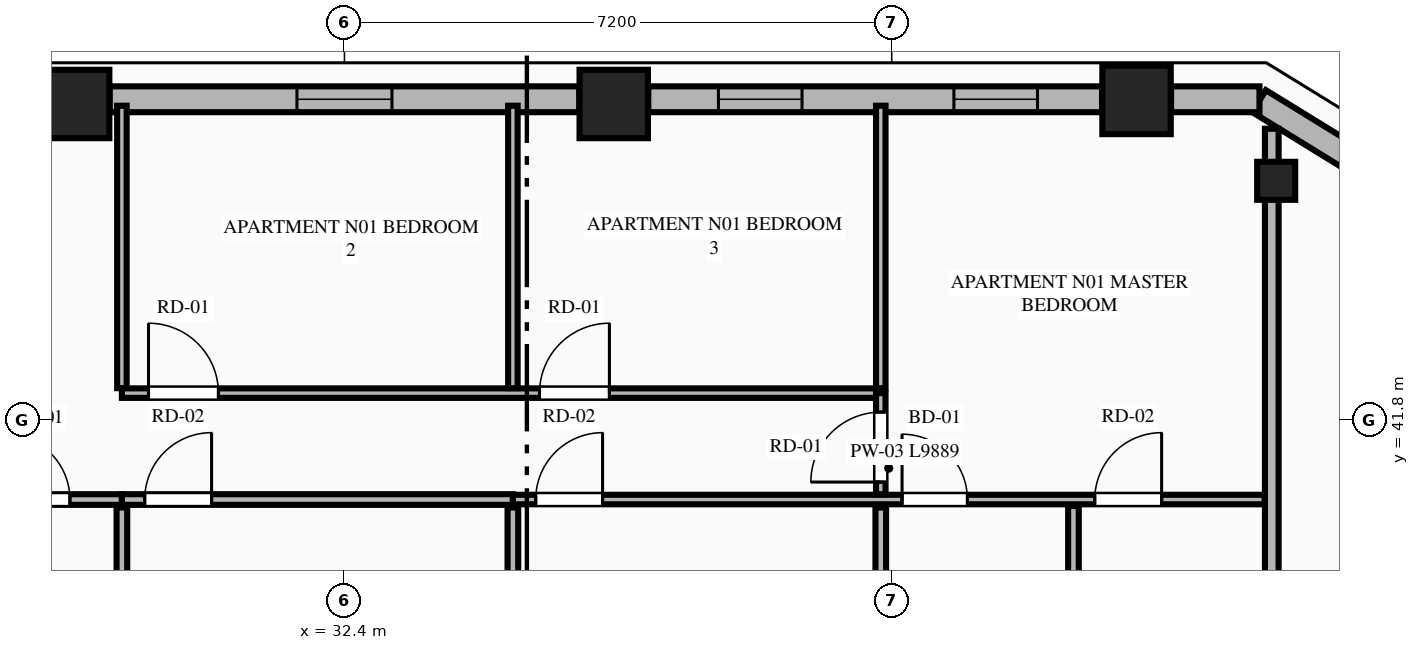
"""IFC4 building model, lengths in metres.
Left out: names, types, materials, properties, quantities, classifications, styles, units other than length and angle.
Written with IfcOpenShell. Run it as: python <this file> out.ifc"""

import sys

from ifc_helpers import new_model, si_unit, direction, frame, frame_2d, origin, origin_2d, place, context, subcontext, project, spatial, rectangle, extrude, element, fill, save


model = new_model("IFC4")
c1 = context("Model", 3, precision=1e-05, world=origin(), true_north=direction((0.0, 1.0)))
c2 = subcontext(c1, "Body", "Model", "MODEL_VIEW")
j1 = project(units=[si_unit("LENGTHUNIT", "METRE"), si_unit("PLANEANGLEUNIT", "RADIAN")], contexts=[c1])
p1 = place(None, origin())
s1 = spatial("IfcSite", under=j1, at=p1, CompositionType="ELEMENT")
p2 = place(p1, origin())
s2 = spatial("IfcBuilding", under=s1, at=p2, CompositionType="ELEMENT")
p3 = place(p2, frame((0.0, 0.0, 189.65)))
s3 = spatial("IfcBuildingStorey", under=s2, at=p3, CompositionType="ELEMENT", Elevation=189.65)
for number, where, z_axis, x_axis in (
    (1, (42.821, 46.011, 0.0), (0.0, 0.0, 1.0), (1.0, 0.0, 0.0)),
    (2, (35.943, 45.958, 0.0), (0.0, 0.0, 1.0), (1.0, 0.0, 0.0)),
    (3, (28.857, 45.958, 0.0), (0.0, 0.0, 1.0), (1.0, 0.0, 0.0)),
):
    element("IfcColumn", number, at=place(p3, frame(where, z_axis=z_axis, x_axis=x_axis)), inside=s3, PredefinedType="COLUMN", context=c2, shape_type="SweptSolid", body=[
        extrude(rectangle(XDim=0.9, YDim=0.9, at=origin_2d()), origin(), (0.0, 0.0, 1.0), 3.55),
    ])
p4 = place(p3, frame((44.658, 44.947, 0.0), z_axis=(0.0, 0.0, 1.0), x_axis=(-0.865230187018, 0.501374833306, 0.0)))
e4 = element("IfcColumn", 4, at=p4, inside=s3, PredefinedType="PILASTER", context=c2, shape_type="SweptSolid", body=[
    extrude(rectangle(XDim=0.5, YDim=0.35, at=origin_2d()), origin(), (0.0, 0.0, 1.0), 3.55),
])
p5 = place(p3, frame((45.862, 45.116, 0.0), z_axis=(0.0, 0.0, 1.0), x_axis=(-0.851713271379, 0.524008113828, 0.0)))
e5 = element("IfcWall", 5, at=p5, inside=s3, PredefinedType="STANDARD", context=c2, shape_type="SweptSolid", body=[
    extrude(rectangle(XDim=1.678, YDim=0.34, at=frame_2d((0.839, 0.0))), origin(), (0.0, 0.0, 1.0), 3.35),
])
p6 = place(p3, frame((44.438, 46.02, 0.0), z_axis=(0.0, 0.0, 1.0), x_axis=(-1.0, 0.0, 0.0)))
e6 = element("IfcWall", 6, at=p6, inside=s3, PredefinedType="STANDARD", context=c2, shape_type="SweptSolid", body=[
    extrude(rectangle(XDim=1.163, YDim=0.34, at=frame_2d((0.582, 0.0))), origin(), (0.0, 0.0, 1.0), 3.35),
])
p7 = place(p3, frame((42.367, 46.02, 0.0), z_axis=(0.0, 0.0, 1.0), x_axis=(-1.0, 0.0, 0.0)))
e7 = element("IfcWall", 7, at=p7, inside=s3, PredefinedType="STANDARD", context=c2, shape_type="SweptSolid", body=[
    extrude(rectangle(XDim=5.97, YDim=0.34, at=frame_2d((2.985, 0.0))), origin(), (0.0, 0.0, 1.0), 2.883),
])
p8 = place(p7, frame((0.849, 0.0, 0.75)))
e8 = element("IfcOpeningElement", 8, at=p8, cuts=e7, PredefinedType="OPENING", context=c2, shape_type="SweptSolid", body=[
    extrude(rectangle(XDim=1.1, YDim=1.983, at=frame_2d((0.55, 0.991))), frame((0.0, 0.18, 0.0), z_axis=(0.0, -1.0, 0.0), x_axis=(1.0, 0.0, 0.0)), (0.0, 0.0, 1.0), 0.36),
])
p9 = place(p7, frame((3.947, 0.0, 0.75)))
e9 = element("IfcOpeningElement", 9, at=p9, cuts=e7, PredefinedType="OPENING", context=c2, shape_type="SweptSolid", body=[
    extrude(rectangle(XDim=1.1, YDim=1.983, at=frame_2d((0.55, 0.991))), frame((0.0, 0.18, 0.0), z_axis=(0.0, -1.0, 0.0), x_axis=(1.0, 0.0, 0.0)), (0.0, 0.0, 1.0), 0.36),
])
p10 = place(p3, frame((35.489, 46.02, 0.0), z_axis=(0.0, 0.0, 1.0), x_axis=(-1.0, 0.0, 0.0)))
e10 = element("IfcWall", 10, at=p10, inside=s3, PredefinedType="STANDARD", context=c2, shape_type="SweptSolid", body=[
    extrude(rectangle(XDim=6.178, YDim=0.34, at=frame_2d((3.089, 0.0))), origin(), (0.0, 0.0, 1.0), 2.883),
])
p11 = place(p10, frame((2.464, 0.0, 0.75)))
e11 = element("IfcOpeningElement", 11, at=p11, cuts=e10, PredefinedType="OPENING", context=c2, shape_type="SweptSolid", body=[
    extrude(rectangle(XDim=1.25, YDim=1.95, at=frame_2d((0.625, 0.975))), frame((0.0, 0.18, 0.0), z_axis=(0.0, -1.0, 0.0), x_axis=(1.0, 0.0, 0.0)), (0.0, 0.0, 1.0), 0.36),
])
p12 = place(p3, frame((44.6, 35.15, 0.0), z_axis=(0.0, 0.0, 1.0), x_axis=(0.0, 1.0, 0.0)))
e12 = element("IfcWall", 12, at=p12, inside=s3, PredefinedType="PARTITIONING", context=c2, shape_type="SweptSolid", body=[
    extrude(rectangle(XDim=10.482, YDim=0.18, at=frame_2d((5.241, 0.0))), origin(), (0.0, 0.0, 1.0), 3.35),
])
p13 = place(p3, frame((22.25, 40.754, 0.0), z_axis=(0.0, 0.0, 1.0), x_axis=(1.0, 0.0, 0.0)))
e13 = element("IfcWall", 13, at=p13, inside=s3, PredefinedType="PLUMBINGWALL", context=c2, shape_type="SweptSolid", body=[
    extrude(rectangle(XDim=7.222, YDim=0.14, at=frame_2d((3.611, 0.0))), origin(), (0.0, 0.0, 1.0), 3.35),
])
p14 = place(p13, frame((5.678, 0.0, 0.0)))
e14 = element("IfcOpeningElement", 14, at=p14, cuts=e13, PredefinedType="OPENING", context=c2, shape_type="SweptSolid", body=[
    extrude(rectangle(XDim=0.86, YDim=2.1, at=frame_2d((0.43, 1.05))), frame((0.0, 0.08, 0.0), z_axis=(0.0, -1.0, 0.0), x_axis=(1.0, 0.0, 0.0)), (0.0, 0.0, 1.0), 0.16),
])
p15 = place(p13, frame((0.26, 0.0, 0.0)))
e15 = element("IfcOpeningElement", 15, at=p15, cuts=e13, PredefinedType="OPENING", context=c2, shape_type="SweptSolid", body=[
    extrude(rectangle(XDim=0.88, YDim=2.15, at=frame_2d((0.44, 1.075))), frame((0.0, 0.08, 0.0), z_axis=(0.0, -1.0, 0.0), x_axis=(1.0, 0.0, 0.0)), (0.0, 0.0, 1.0), 0.16),
])
p16 = place(p13, frame((3.424, 0.0, 0.0)))
e16 = element("IfcOpeningElement", 16, at=p16, cuts=e13, PredefinedType="OPENING", context=c2, shape_type="SweptSolid", body=[
    extrude(rectangle(XDim=0.88, YDim=2.15, at=frame_2d((0.44, 1.075))), frame((0.0, 0.08, 0.0), z_axis=(0.0, -1.0, 0.0), x_axis=(1.0, 0.0, 0.0)), (0.0, 0.0, 1.0), 0.16),
])
p17 = place(p3, frame((29.472, 40.754, 0.0), z_axis=(0.0, 0.0, 1.0), x_axis=(1.0, 0.0, 0.0)))
e17 = element("IfcWall", 17, at=p17, inside=s3, PredefinedType="PLUMBINGWALL", context=c2, shape_type="SweptSolid", body=[
    extrude(rectangle(XDim=5.144, YDim=0.14, at=frame_2d((2.572, 0.0))), origin(), (0.0, 0.0, 1.0), 3.35),
])
p18 = place(p17, frame((0.3, 0.0, 0.0)))
e18 = element("IfcOpeningElement", 18, at=p18, cuts=e17, PredefinedType="OPENING", context=c2, shape_type="SweptSolid", body=[
    extrude(rectangle(XDim=0.88, YDim=2.15, at=frame_2d((0.44, 1.075))), frame((0.0, 0.08, 0.0), z_axis=(0.0, -1.0, 0.0), x_axis=(1.0, 0.0, 0.0)), (0.0, 0.0, 1.0), 0.16),
])
p19 = place(p3, frame((34.616, 40.754, 0.0), z_axis=(0.0, 0.0, 1.0), x_axis=(1.0, 0.0, 0.0)))
e19 = element("IfcWall", 19, at=p19, inside=s3, PredefinedType="PARTITIONING", context=c2, shape_type="SweptSolid", body=[
    extrude(rectangle(XDim=9.889, YDim=0.125, at=frame_2d((4.944, 0.0))), origin(), (0.0, 0.0, 1.0), 3.35),
])
p20 = place(p19, frame((5.12, 0.0, 0.0)))
e20 = element("IfcOpeningElement", 20, at=p20, cuts=e19, PredefinedType="OPENING", context=c2, shape_type="SweptSolid", body=[
    extrude(rectangle(XDim=0.86, YDim=2.1, at=frame_2d((0.43, 1.05))), frame((0.0, 0.073, 0.0), z_axis=(0.0, -1.0, 0.0), x_axis=(1.0, 0.0, 0.0)), (0.0, 0.0, 1.0), 0.145),
])
p21 = place(p19, frame((7.655, 0.0, 0.0)))
e21 = element("IfcOpeningElement", 21, at=p21, cuts=e19, PredefinedType="OPENING", context=c2, shape_type="SweptSolid", body=[
    extrude(rectangle(XDim=0.88, YDim=2.15, at=frame_2d((0.44, 1.075))), frame((0.0, 0.073, 0.0), z_axis=(0.0, -1.0, 0.0), x_axis=(1.0, 0.0, 0.0)), (0.0, 0.0, 1.0), 0.145),
])
p22 = place(p19, frame((0.3, 0.0, 0.0)))
e22 = element("IfcOpeningElement", 22, at=p22, cuts=e19, PredefinedType="OPENING", context=c2, shape_type="SweptSolid", body=[
    extrude(rectangle(XDim=0.88, YDim=2.15, at=frame_2d((0.44, 1.075))), frame((0.0, 0.073, 0.0), z_axis=(0.0, -1.0, 0.0), x_axis=(1.0, 0.0, 0.0)), (0.0, 0.0, 1.0), 0.145),
])
p23 = place(p3, frame((29.472, 42.219, 0.0), z_axis=(0.0, 0.0, 1.0), x_axis=(0.0, 1.0, 0.0)))
e23 = element("IfcWall", 23, at=p23, inside=s3, PredefinedType="PARTITIONING", context=c2, shape_type="SweptSolid", body=[
    extrude(rectangle(XDim=3.716, YDim=0.125, at=frame_2d((1.858, 0.0))), origin(), (0.0, 0.0, 1.0), 3.35),
])
p24 = place(p3, frame((29.472, 42.154, 0.0), z_axis=(0.0, 0.0, 1.0), x_axis=(1.0, 0.0, 0.0)))
e24 = element("IfcWall", 24, at=p24, inside=s3, PredefinedType="PARTITIONING", context=c2, shape_type="SweptSolid", body=[
    extrude(rectangle(XDim=9.984, YDim=0.125, at=frame_2d((4.992, 0.0))), origin(), (0.0, 0.0, 1.0), 3.35),
])
p25 = place(p24, frame((0.35, 0.0, 0.0)))
e25 = element("IfcOpeningElement", 25, at=p25, cuts=e24, PredefinedType="OPENING", context=c2, shape_type="SweptSolid", body=[
    extrude(rectangle(XDim=0.92, YDim=2.15, at=frame_2d((0.46, 1.075))), frame((0.0, 0.073, 0.0), z_axis=(0.0, -1.0, 0.0), x_axis=(1.0, 0.0, 0.0)), (0.0, 0.0, 1.0), 0.145),
])
p26 = place(p24, frame((5.494, 0.0, 0.0)))
e26 = element("IfcOpeningElement", 26, at=p26, cuts=e24, PredefinedType="OPENING", context=c2, shape_type="SweptSolid", body=[
    extrude(rectangle(XDim=0.92, YDim=2.15, at=frame_2d((0.46, 1.075))), frame((0.0, 0.073, 0.0), z_axis=(0.0, -1.0, 0.0), x_axis=(1.0, 0.0, 0.0)), (0.0, 0.0, 1.0), 0.145),
])
p27 = place(p3, frame((39.456, 40.824, 0.0), z_axis=(0.0, 0.0, 1.0), x_axis=(0.0, 1.0, 0.0)))
e27 = element("IfcWall", 27, at=p27, inside=s3, PredefinedType="PARTITIONING", context=c2, shape_type="SweptSolid", body=[
    extrude(rectangle(XDim=1.33, YDim=0.125, at=frame_2d((0.665, 0.0))), origin(), (0.0, 0.0, 1.0), 3.35),
])
p28 = place(p27, frame((0.16, 0.0, 0.0)))
e28 = element("IfcOpeningElement", 28, at=p28, cuts=e27, PredefinedType="OPENING", context=c2, shape_type="SweptSolid", body=[
    extrude(rectangle(XDim=0.92, YDim=2.15, at=frame_2d((0.46, 1.075))), frame((0.0, 0.073, 0.0), z_axis=(0.0, -1.0, 0.0), x_axis=(1.0, 0.0, 0.0)), (0.0, 0.0, 1.0), 0.145),
])
for number, where, z_axis, x_axis in (
    (29, (29.472, 35.235, 0.0), (0.0, 0.0, 1.0), (0.0, 1.0, 0.0)),
    (30, (34.616, 35.235, 0.0), (0.0, 0.0, 1.0), (0.0, 1.0, 0.0)),
):
    element("IfcWall", number, at=place(p3, frame(where, z_axis=z_axis, x_axis=x_axis)), inside=s3, PredefinedType="PLUMBINGWALL", context=c2, shape_type="SweptSolid", body=[
        extrude(rectangle(XDim=5.414, YDim=0.14, at=frame_2d((2.707, 0.0))), origin(), (0.0, 0.0, 1.0), 3.35),
    ])
for number, where, z_axis, x_axis in (
    (31, (34.616, 42.219, 0.0), (0.0, 0.0, 1.0), (0.0, 1.0, 0.0)),
    (32, (39.456, 42.219, 0.0), (0.0, 0.0, 1.0), (0.0, 1.0, 0.0)),
):
    element("IfcWall", number, at=place(p3, frame(where, z_axis=z_axis, x_axis=x_axis)), inside=s3, PredefinedType="PARTITIONING", context=c2, shape_type="SweptSolid", body=[
        extrude(rectangle(XDim=3.716, YDim=0.125, at=frame_2d((1.858, 0.0))), origin(), (0.0, 0.0, 1.0), 3.35),
    ])
p29 = place(p3, frame((39.456, 35.235, 0.0), z_axis=(0.0, 0.0, 1.0), x_axis=(0.0, 1.0, 0.0)))
e33 = element("IfcWall", 33, at=p29, inside=s3, PredefinedType="PLUMBINGWALL", context=c2, shape_type="SweptSolid", body=[
    extrude(rectangle(XDim=5.414, YDim=0.14, at=frame_2d((2.707, 0.0))), origin(), (0.0, 0.0, 1.0), 3.35),
])
p30 = place(p3, frame((41.991, 35.235, 0.0), z_axis=(0.0, 0.0, 1.0), x_axis=(0.0, 1.0, 0.0)))
e34 = element("IfcWall", 34, at=p30, inside=s3, PredefinedType="PLUMBINGWALL", context=c2, shape_type="SweptSolid", body=[
    extrude(rectangle(XDim=5.434, YDim=0.14, at=frame_2d((2.717, 0.0))), origin(), (0.0, 0.0, 1.0), 2.807),
])
p31 = place(p8, origin())
e35 = element("IfcWindow", 35, at=p31, inside=s3, PartitioningType="SINGLE_PANEL", PredefinedType="WINDOW", context=c2, shape_type="SweptSolid", body=[
    extrude(rectangle(XDim=1.1, YDim=1.983, at=frame_2d((0.55, 0.991))), frame((0.0, 0.03, 0.0), z_axis=(0.0, -1.0, 0.0), x_axis=(1.0, 0.0, 0.0)), (0.0, 0.0, 1.0), 0.06),
])
fill(e8, e35)
p32 = place(p11, origin())
e36 = element("IfcWindow", 36, at=p32, inside=s3, PartitioningType="SINGLE_PANEL", PredefinedType="WINDOW", context=c2, shape_type="SweptSolid", body=[
    extrude(rectangle(XDim=1.25, YDim=1.95, at=frame_2d((0.625, 0.975))), frame((0.0, 0.03, 0.0), z_axis=(0.0, -1.0, 0.0), x_axis=(1.0, 0.0, 0.0)), (0.0, 0.0, 1.0), 0.06),
])
fill(e11, e36)
p33 = place(p14, origin())
e37 = element("IfcDoor", 37, at=p33, inside=s3, OperationType="SINGLE_SWING_LEFT", PredefinedType="DOOR", context=c2, shape_type="SweptSolid", body=[
    extrude(rectangle(XDim=0.86, YDim=2.1, at=frame_2d((0.43, 1.05))), frame((0.0, 0.025, 0.0), z_axis=(0.0, -1.0, 0.0), x_axis=(1.0, 0.0, 0.0)), (0.0, 0.0, 1.0), 0.05),
])
fill(e14, e37)
p34 = place(p20, origin())
e38 = element("IfcDoor", 38, at=p34, inside=s3, OperationType="SINGLE_SWING_LEFT", PredefinedType="DOOR", context=c2, shape_type="SweptSolid", body=[
    extrude(rectangle(XDim=0.86, YDim=2.1, at=frame_2d((0.43, 1.05))), frame((0.0, 0.025, 0.0), z_axis=(0.0, -1.0, 0.0), x_axis=(1.0, 0.0, 0.0)), (0.0, 0.0, 1.0), 0.05),
])
fill(e20, e38)
p35 = place(p21, origin())
e39 = element("IfcDoor", 39, at=p35, inside=s3, OperationType="SINGLE_SWING_RIGHT", PredefinedType="DOOR", context=c2, shape_type="SweptSolid", body=[
    extrude(rectangle(XDim=0.88, YDim=2.15, at=frame_2d((0.44, 1.075))), frame((0.0, 0.025, 0.0), z_axis=(0.0, -1.0, 0.0), x_axis=(1.0, 0.0, 0.0)), (0.0, 0.0, 1.0), 0.05),
])
fill(e21, e39)
p36 = place(p18, origin())
e40 = element("IfcDoor", 40, at=p36, inside=s3, OperationType="SINGLE_SWING_RIGHT", PredefinedType="DOOR", context=c2, shape_type="SweptSolid", body=[
    extrude(rectangle(XDim=0.88, YDim=2.15, at=frame_2d((0.44, 1.075))), frame((0.0, 0.025, 0.0), z_axis=(0.0, -1.0, 0.0), x_axis=(1.0, 0.0, 0.0)), (0.0, 0.0, 1.0), 0.05),
])
fill(e18, e40)
p37 = place(p25, origin())
e41 = element("IfcDoor", 41, at=p37, inside=s3, OperationType="SINGLE_SWING_LEFT", PredefinedType="DOOR", context=c2, shape_type="SweptSolid", body=[
    extrude(rectangle(XDim=0.92, YDim=2.15, at=frame_2d((0.46, 1.075))), frame((0.0, 0.025, 0.0), z_axis=(0.0, -1.0, 0.0), x_axis=(1.0, 0.0, 0.0)), (0.0, 0.0, 1.0), 0.05),
])
fill(e25, e41)
p38 = place(p26, origin())
e42 = element("IfcDoor", 42, at=p38, inside=s3, OperationType="SINGLE_SWING_RIGHT", PredefinedType="DOOR", context=c2, shape_type="SweptSolid", body=[
    extrude(rectangle(XDim=0.92, YDim=2.15, at=frame_2d((0.46, 1.075))), frame((0.0, 0.025, 0.0), z_axis=(0.0, -1.0, 0.0), x_axis=(1.0, 0.0, 0.0)), (0.0, 0.0, 1.0), 0.05),
])
fill(e26, e42)
p39 = place(p28, origin())
e43 = element("IfcDoor", 43, at=p39, inside=s3, OperationType="SINGLE_SWING_LEFT", PredefinedType="DOOR", context=c2, shape_type="SweptSolid", body=[
    extrude(rectangle(XDim=0.92, YDim=2.15, at=frame_2d((0.46, 1.075))), frame((0.0, 0.025, 0.0), z_axis=(0.0, -1.0, 0.0), x_axis=(1.0, 0.0, 0.0)), (0.0, 0.0, 1.0), 0.05),
])
fill(e28, e43)
p40 = place(p22, origin())
e44 = element("IfcDoor", 44, at=p40, inside=s3, OperationType="SINGLE_SWING_RIGHT", PredefinedType="DOOR", context=c2, shape_type="SweptSolid", body=[
    extrude(rectangle(XDim=0.88, YDim=2.15, at=frame_2d((0.44, 1.075))), frame((0.0, 0.025, 0.0), z_axis=(0.0, -1.0, 0.0), x_axis=(1.0, 0.0, 0.0)), (0.0, 0.0, 1.0), 0.05),
])
fill(e22, e44)
p41 = place(p9, origin())
e45 = element("IfcWindow", 45, at=p41, inside=s3, PartitioningType="SINGLE_PANEL", PredefinedType="WINDOW", context=c2, shape_type="SweptSolid", body=[
    extrude(rectangle(XDim=1.1, YDim=1.983, at=frame_2d((0.55, 0.991))), frame((0.0, 0.03, 0.0), z_axis=(0.0, -1.0, 0.0), x_axis=(1.0, 0.0, 0.0)), (0.0, 0.0, 1.0), 0.06),
])
fill(e9, e45)
save(model, sys.argv[1])
